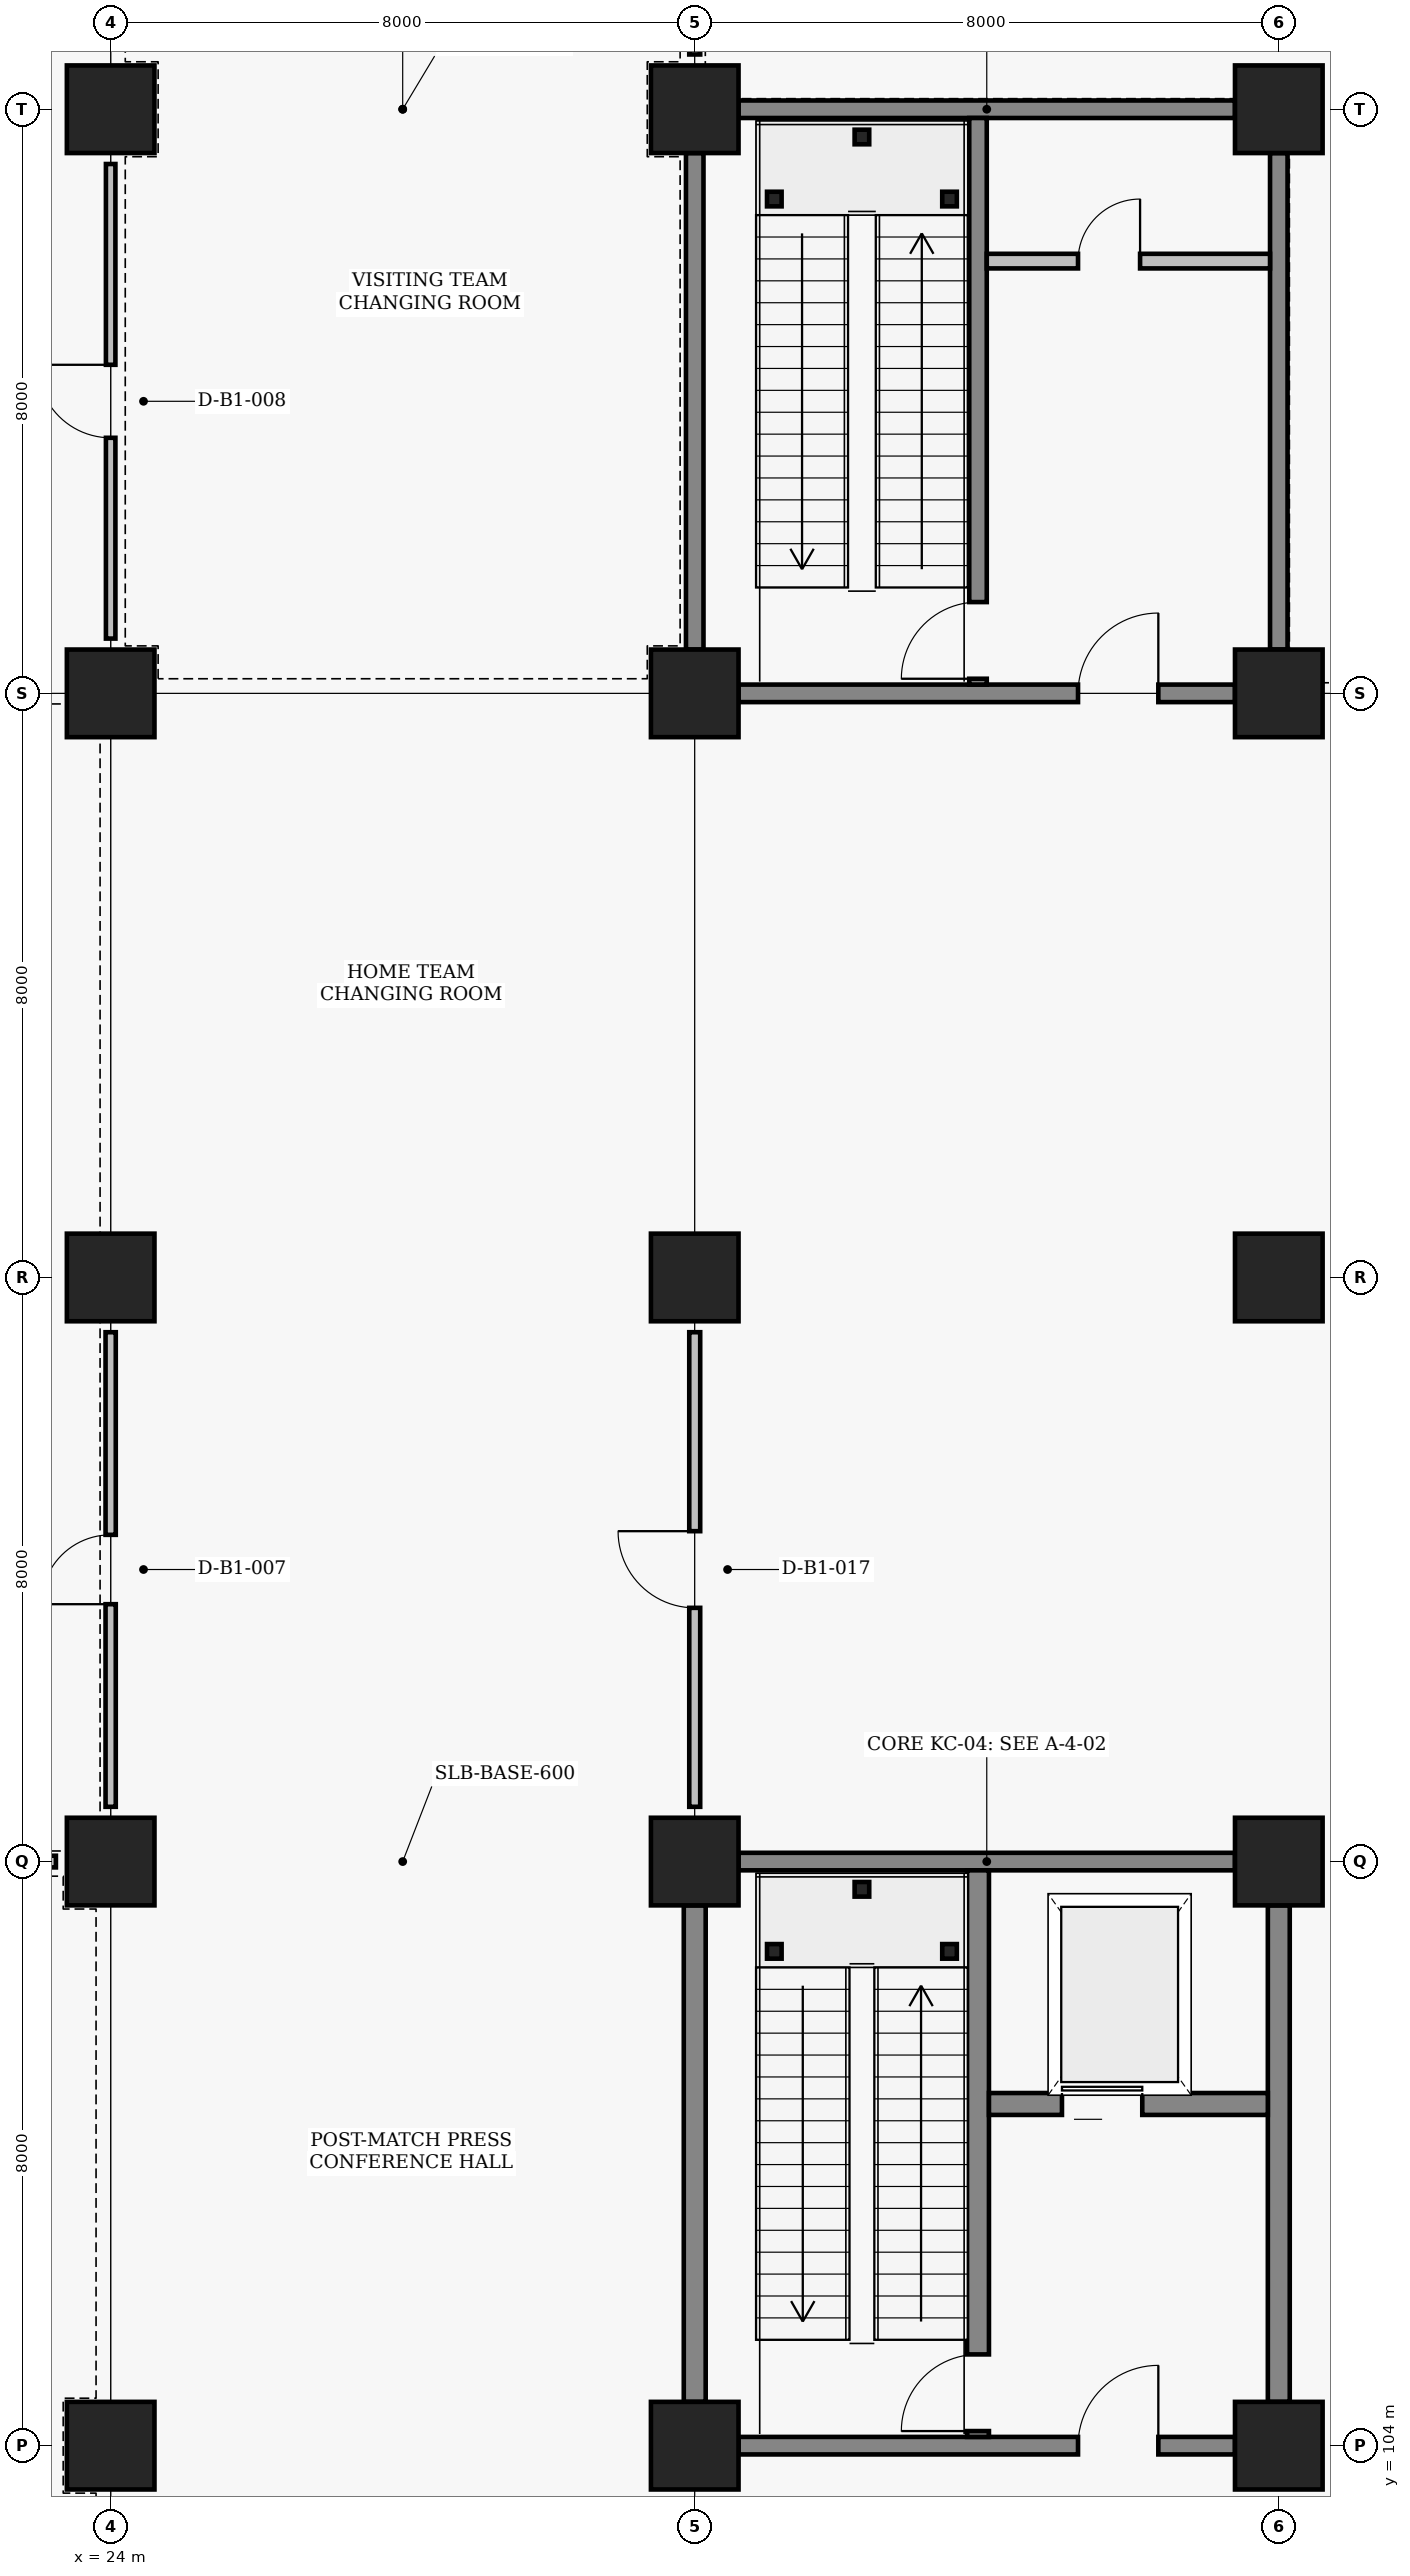
"""IFC4 building model, lengths in metres.
Left out: names, types, materials, properties, quantities, classifications, styles, units other than length and angle.
Written with IfcOpenShell. Run it as: python <this file> out.ifc"""

import sys

from ifc_helpers import new_model, si_unit, direction, frame, frame_2d, origin, origin_2d, place, context, subcontext, project, spatial, rectangle, hollow_rectangle, extrude, element, fill, save


model = new_model("IFC4")
c1 = context("Model", 3, precision=1e-05, world=origin(), true_north=direction((0.0, 1.0)))
c2 = subcontext(c1, "Body", "Model", "MODEL_VIEW")
j1 = project(units=[si_unit("LENGTHUNIT", "METRE"), si_unit("PLANEANGLEUNIT", "RADIAN")], contexts=[c1])
p1 = place(None, origin())
s1 = spatial("IfcSite", under=j1, at=p1, CompositionType="ELEMENT")
p2 = place(p1, origin())
s2 = spatial("IfcBuilding", under=s1, at=p2, CompositionType="ELEMENT")
p3 = place(p2, frame((0.0, 0.0, -5.4)))
s3 = spatial("IfcBuildingStorey", under=s2, at=p3, CompositionType="ELEMENT", Elevation=-5.4)
for number, where, z_axis, x_axis in (
    (1, (24.0, 104.0, 0.0), (0.0, 0.0, 1.0), (1.0, 0.0, 0.0)),
    (2, (24.0, 112.0, 0.0), (0.0, 0.0, 1.0), (1.0, 0.0, 0.0)),
    (3, (24.0, 120.0, 0.0), (0.0, 0.0, 1.0), (1.0, 0.0, 0.0)),
    (4, (24.0, 128.0, 0.0), (0.0, 0.0, 1.0), (1.0, 0.0, 0.0)),
    (5, (24.0, 136.0, 0.0), (0.0, 0.0, 1.0), (1.0, 0.0, 0.0)),
    (6, (32.0, 104.0, 0.0), (0.0, 0.0, 1.0), (1.0, 0.0, 0.0)),
    (7, (32.0, 112.0, 0.0), (0.0, 0.0, 1.0), (1.0, 0.0, 0.0)),
    (8, (32.0, 120.0, 0.0), (0.0, 0.0, 1.0), (1.0, 0.0, 0.0)),
    (9, (32.0, 128.0, 0.0), (0.0, 0.0, 1.0), (1.0, 0.0, 0.0)),
    (10, (32.0, 136.0, 0.0), (0.0, 0.0, 1.0), (1.0, 0.0, 0.0)),
    (11, (40.0, 104.0, 0.0), (0.0, 0.0, 1.0), (1.0, 0.0, 0.0)),
    (12, (40.0, 112.0, 0.0), (0.0, 0.0, 1.0), (1.0, 0.0, 0.0)),
    (13, (40.0, 120.0, 0.0), (0.0, 0.0, 1.0), (1.0, 0.0, 0.0)),
    (14, (40.0, 128.0, 0.0), (0.0, 0.0, 1.0), (1.0, 0.0, 0.0)),
    (15, (40.0, 136.0, 0.0), (0.0, 0.0, 1.0), (1.0, 0.0, 0.0)),
):
    element("IfcColumn", number, at=place(p3, frame(where, z_axis=z_axis, x_axis=x_axis)), inside=s3, PredefinedType="COLUMN", context=c2, shape_type="SweptSolid", body=[
        extrude(rectangle(XDim=1.2, YDim=1.2, at=origin_2d()), origin(), (0.0, 0.0, 1.0), 5.4),
    ])
p4 = place(p3, frame((32.6, 104.0, 0.0), z_axis=(0.0, 0.0, 1.0), x_axis=(1.0, 0.0, 0.0)))
e16 = element("IfcWall", 16, at=p4, inside=s3, PredefinedType="SHEAR", context=c2, shape_type="SweptSolid", body=[
    extrude(rectangle(XDim=6.8, YDim=0.24, at=frame_2d((3.4, 0.0))), origin(), (0.0, 0.0, 1.0), 4.59),
])
p5 = place(p4, frame((4.65, 0.0, 0.0)))
e17 = element("IfcOpeningElement", 17, at=p5, cuts=e16, PredefinedType="OPENING", context=c2, shape_type="SweptSolid", body=[
    extrude(rectangle(XDim=1.1, YDim=2.2, at=frame_2d((0.55, 1.1))), frame((0.0, 0.13, 0.0), z_axis=(0.0, -1.0, 0.0), x_axis=(1.0, 0.0, 0.0)), (0.0, 0.0, 1.0), 0.26),
])
p6 = place(p3, frame((32.6, 112.0, 0.0), z_axis=(0.0, 0.0, 1.0), x_axis=(1.0, 0.0, 0.0)))
e18 = element("IfcWall", 18, at=p6, inside=s3, PredefinedType="SHEAR", context=c2, shape_type="SweptSolid", body=[
    extrude(rectangle(XDim=6.8, YDim=0.24, at=frame_2d((3.4, 0.0))), origin(), (0.0, 0.0, 1.0), 4.59),
])
for number, where, z_axis, x_axis in (
    (19, (32.0, 104.6, 0.0), (0.0, 0.0, 1.0), (0.0, 1.0, 0.0)),
    (20, (40.0, 104.6, 0.0), (0.0, 0.0, 1.0), (0.0, 1.0, 0.0)),
):
    element("IfcWall", number, at=place(p3, frame(where, z_axis=z_axis, x_axis=x_axis)), inside=s3, PredefinedType="SHEAR", context=c2, shape_type="SweptSolid", body=[
        extrude(rectangle(XDim=6.8, YDim=0.3, at=frame_2d((3.4, 0.0))), origin(), (0.0, 0.0, 1.0), 4.39),
    ])
p7 = place(p3, frame((35.88, 104.12, 0.0), z_axis=(0.0, 0.0, 1.0), x_axis=(0.0, 1.0, 0.0)))
e21 = element("IfcWall", 21, at=p7, inside=s3, PredefinedType="SHEAR", context=c2, shape_type="SweptSolid", body=[
    extrude(rectangle(XDim=7.76, YDim=0.3, at=frame_2d((3.88, 0.0))), origin(), (0.0, 0.0, 1.0), 4.59),
])
p8 = place(p7, frame((0.08, 0.0, 0.0)))
e22 = element("IfcOpeningElement", 22, at=p8, cuts=e21, PredefinedType="OPENING", context=c2, shape_type="SweptSolid", body=[
    extrude(rectangle(XDim=1.05, YDim=2.15, at=frame_2d((0.525, 1.075))), frame((0.0, 0.16, 0.0), z_axis=(0.0, -1.0, 0.0), x_axis=(1.0, 0.0, 0.0)), (0.0, 0.0, 1.0), 0.32),
])
p9 = place(p3, frame((36.03, 108.68, 0.0), z_axis=(0.0, 0.0, 1.0), x_axis=(1.0, 0.0, 0.0)))
e23 = element("IfcWall", 23, at=p9, inside=s3, PredefinedType="SHEAR", context=c2, shape_type="SweptSolid", body=[
    extrude(rectangle(XDim=3.82, YDim=0.3, at=frame_2d((1.91, 0.0))), origin(), (0.0, 0.0, 1.0), 4.39),
])
p10 = place(p9, frame((1.0, 0.0, 0.0)))
e24 = element("IfcOpeningElement", 24, at=p10, cuts=e23, PredefinedType="OPENING", context=c2, shape_type="SweptSolid", body=[
    extrude(rectangle(XDim=1.1, YDim=2.15, at=frame_2d((0.55, 1.075))), frame((0.0, 0.16, 0.0), z_axis=(0.0, -1.0, 0.0), x_axis=(1.0, 0.0, 0.0)), (0.0, 0.0, 1.0), 0.32),
])
for number, where, z_axis, x_axis in (
    (25, (33.09, 110.77, 0.0), (0.0, 0.0, 1.0), (1.0, 0.0, 0.0)),
    (26, (35.49, 110.77, 0.0), (0.0, 0.0, 1.0), (1.0, 0.0, 0.0)),
    (27, (34.29, 111.62, 0.0), (0.0, 0.0, 1.0), (1.0, 0.0, 0.0)),
):
    element("IfcColumn", number, at=place(p3, frame(where, z_axis=z_axis, x_axis=x_axis)), inside=s3, PredefinedType="COLUMN", context=c2, shape_type="SweptSolid", body=[
        extrude(hollow_rectangle(XDim=0.2, YDim=0.2, WallThickness=0.009, at=origin_2d()), origin(), (0.0, 0.0, 1.0), 2.5),
    ])
p11 = place(p3, frame((32.6, 128.0, 0.0), z_axis=(0.0, 0.0, 1.0), x_axis=(1.0, 0.0, 0.0)))
e28 = element("IfcWall", 28, at=p11, inside=s3, PredefinedType="SHEAR", context=c2, shape_type="SweptSolid", body=[
    extrude(rectangle(XDim=6.8, YDim=0.24, at=frame_2d((3.4, 0.0))), origin(), (0.0, 0.0, 1.0), 3.69),
])
p12 = place(p11, frame((4.65, 0.0, 0.0)))
e29 = element("IfcOpeningElement", 29, at=p12, cuts=e28, PredefinedType="OPENING", context=c2, shape_type="SweptSolid", body=[
    extrude(rectangle(XDim=1.1, YDim=2.2, at=frame_2d((0.55, 1.1))), frame((0.0, 0.13, 0.0), z_axis=(0.0, -1.0, 0.0), x_axis=(1.0, 0.0, 0.0)), (0.0, 0.0, 1.0), 0.26),
])
p13 = place(p3, frame((32.6, 136.0, 0.0), z_axis=(0.0, 0.0, 1.0), x_axis=(1.0, 0.0, 0.0)))
e30 = element("IfcWall", 30, at=p13, inside=s3, PredefinedType="SHEAR", context=c2, shape_type="SweptSolid", body=[
    extrude(rectangle(XDim=6.8, YDim=0.24, at=frame_2d((3.4, 0.0))), origin(), (0.0, 0.0, 1.0), 4.59),
])
p14 = place(p3, frame((32.0, 128.6, 0.0), z_axis=(0.0, 0.0, 1.0), x_axis=(0.0, 1.0, 0.0)))
e31 = element("IfcWall", 31, at=p14, inside=s3, PredefinedType="SHEAR", context=c2, shape_type="SweptSolid", body=[
    extrude(rectangle(XDim=6.8, YDim=0.24, at=frame_2d((3.4, 0.0))), origin(), (0.0, 0.0, 1.0), 4.39),
])
p15 = place(p3, frame((40.0, 128.6, 0.0), z_axis=(0.0, 0.0, 1.0), x_axis=(0.0, 1.0, 0.0)))
e32 = element("IfcWall", 32, at=p15, inside=s3, PredefinedType="SHEAR", context=c2, shape_type="SweptSolid", body=[
    extrude(rectangle(XDim=6.8, YDim=0.24, at=frame_2d((3.4, 0.0))), origin(), (0.0, 0.0, 1.0), 3.69),
])
p16 = place(p3, frame((35.88, 128.12, 0.0), z_axis=(0.0, 0.0, 1.0), x_axis=(0.0, 1.0, 0.0)))
e33 = element("IfcWall", 33, at=p16, inside=s3, PredefinedType="SHEAR", context=c2, shape_type="SweptSolid", body=[
    extrude(rectangle(XDim=7.76, YDim=0.24, at=frame_2d((3.88, 0.0))), origin(), (0.0, 0.0, 1.0), 4.59),
])
p17 = place(p16, frame((0.08, 0.0, 0.0)))
e34 = element("IfcOpeningElement", 34, at=p17, cuts=e33, PredefinedType="OPENING", context=c2, shape_type="SweptSolid", body=[
    extrude(rectangle(XDim=1.05, YDim=2.15, at=frame_2d((0.525, 1.075))), frame((0.0, 0.13, 0.0), z_axis=(0.0, -1.0, 0.0), x_axis=(1.0, 0.0, 0.0)), (0.0, 0.0, 1.0), 0.26),
])
p18 = place(p3, frame((36.0, 133.92, 0.0), z_axis=(0.0, 0.0, 1.0), x_axis=(1.0, 0.0, 0.0)))
e35 = element("IfcWall", 35, at=p18, inside=s3, PredefinedType="PARTITIONING", context=c2, shape_type="SweptSolid", body=[
    extrude(rectangle(XDim=3.88, YDim=0.2, at=frame_2d((1.94, 0.0))), origin(), (0.0, 0.0, 1.0), 4.39),
])
p19 = place(p18, frame((1.25, 0.0, 0.0)))
e36 = element("IfcOpeningElement", 36, at=p19, cuts=e35, PredefinedType="OPENING", context=c2, shape_type="SweptSolid", body=[
    extrude(rectangle(XDim=0.85, YDim=2.05, at=frame_2d((0.425, 1.025))), frame((0.0, 0.11, 0.0), z_axis=(0.0, -1.0, 0.0), x_axis=(1.0, 0.0, 0.0)), (0.0, 0.0, 1.0), 0.22),
])
for number, where, z_axis, x_axis in (
    (37, (33.09, 134.77, 0.0), (0.0, 0.0, 1.0), (1.0, 0.0, 0.0)),
    (38, (35.49, 134.77, 0.0), (0.0, 0.0, 1.0), (1.0, 0.0, 0.0)),
    (39, (34.29, 135.62, 0.0), (0.0, 0.0, 1.0), (1.0, 0.0, 0.0)),
):
    element("IfcColumn", number, at=place(p3, frame(where, z_axis=z_axis, x_axis=x_axis)), inside=s3, PredefinedType="COLUMN", context=c2, shape_type="SweptSolid", body=[
        extrude(hollow_rectangle(XDim=0.2, YDim=0.2, WallThickness=0.009, at=origin_2d()), origin(), (0.0, 0.0, 1.0), 2.5),
    ])
p20 = place(p3, frame((24.0, 112.75, 0.0), z_axis=(0.0, 0.0, 1.0), x_axis=(0.0, 1.0, 0.0)))
e40 = element("IfcWall", 40, at=p20, inside=s3, PredefinedType="MOVABLE", context=c2, shape_type="SweptSolid", body=[
    extrude(rectangle(XDim=6.5, YDim=0.14, at=frame_2d((3.25, 0.0))), origin(), (0.0, 0.0, 1.0), 4.39),
])
p21 = place(p20, frame((2.775, 0.0, 0.0)))
e41 = element("IfcOpeningElement", 41, at=p21, cuts=e40, PredefinedType="OPENING", context=c2, shape_type="SweptSolid", body=[
    extrude(rectangle(XDim=0.95, YDim=2.1, at=frame_2d((0.475, 1.05))), frame((0.0, 0.08, 0.0), z_axis=(0.0, -1.0, 0.0), x_axis=(1.0, 0.0, 0.0)), (0.0, 0.0, 1.0), 0.16),
])
p22 = place(p3, frame((24.0, 128.75, 0.0), z_axis=(0.0, 0.0, 1.0), x_axis=(0.0, 1.0, 0.0)))
e42 = element("IfcWall", 42, at=p22, inside=s3, PredefinedType="PARTITIONING", context=c2, shape_type="SweptSolid", body=[
    extrude(rectangle(XDim=6.5, YDim=0.13, at=frame_2d((3.25, 0.0))), origin(), (0.0, 0.0, 1.0), 4.39),
])
p23 = place(p22, frame((2.75, 0.0, 0.0)))
e43 = element("IfcOpeningElement", 43, at=p23, cuts=e42, PredefinedType="OPENING", context=c2, shape_type="SweptSolid", body=[
    extrude(rectangle(XDim=1.0, YDim=2.1, at=frame_2d((0.5, 1.05))), frame((0.0, 0.075, 0.0), z_axis=(0.0, -1.0, 0.0), x_axis=(1.0, 0.0, 0.0)), (0.0, 0.0, 1.0), 0.15),
])
p24 = place(p3, frame((32.0, 112.75, 0.0), z_axis=(0.0, 0.0, 1.0), x_axis=(0.0, 1.0, 0.0)))
e44 = element("IfcWall", 44, at=p24, inside=s3, PredefinedType="PARTITIONING", context=c2, shape_type="SweptSolid", body=[
    extrude(rectangle(XDim=6.5, YDim=0.15, at=frame_2d((3.25, 0.0))), origin(), (0.0, 0.0, 1.0), 4.39),
])
p25 = place(p24, frame((2.725, 0.0, 0.0)))
e45 = element("IfcOpeningElement", 45, at=p25, cuts=e44, PredefinedType="OPENING", context=c2, shape_type="SweptSolid", body=[
    extrude(rectangle(XDim=1.05, YDim=2.15, at=frame_2d((0.525, 1.075))), frame((0.0, 0.085, 0.0), z_axis=(0.0, -1.0, 0.0), x_axis=(1.0, 0.0, 0.0)), (0.0, 0.0, 1.0), 0.17),
])
p26 = place(p3, frame((32.0, 136.75, 0.0), z_axis=(0.0, 0.0, 1.0), x_axis=(0.0, 1.0, 0.0)))
e46 = element("IfcWall", 46, at=p26, inside=s3, PredefinedType="PARTITIONING", context=c2, shape_type="SweptSolid", body=[
    extrude(rectangle(XDim=6.5, YDim=0.15, at=frame_2d((3.25, 0.0))), origin(), (0.0, 0.0, 1.0), 3.69),
])
p27 = place(p26, frame((2.35, 0.0, 0.0)))
e47 = element("IfcOpeningElement", 47, at=p27, cuts=e46, PredefinedType="OPENING", context=c2, shape_type="SweptSolid", body=[
    extrude(rectangle(XDim=1.8, YDim=2.3, at=frame_2d((0.9, 1.15))), frame((0.0, 0.085, 0.0), z_axis=(0.0, -1.0, 0.0), x_axis=(1.0, 0.0, 0.0)), (0.0, 0.0, 1.0), 0.17),
])
p28 = place(p3, frame((16.75, 112.0, 0.0), z_axis=(0.0, 0.0, 1.0), x_axis=(1.0, 0.0, 0.0)))
e48 = element("IfcWall", 48, at=p28, inside=s3, PredefinedType="PARTITIONING", context=c2, shape_type="SweptSolid", body=[
    extrude(rectangle(XDim=6.5, YDim=0.16, at=frame_2d((3.25, 0.0))), origin(), (0.0, 0.0, 1.0), 4.49),
])
p29 = place(p28, frame((2.75, 0.0, 0.0)))
e49 = element("IfcOpeningElement", 49, at=p29, cuts=e48, PredefinedType="OPENING", context=c2, shape_type="SweptSolid", body=[
    extrude(rectangle(XDim=1.0, YDim=2.1, at=frame_2d((0.5, 1.05))), frame((0.0, 0.09, 0.0), z_axis=(0.0, -1.0, 0.0), x_axis=(1.0, 0.0, 0.0)), (0.0, 0.0, 1.0), 0.18),
])
p30 = place(p5, origin())
e50 = element("IfcDoor", 50, at=p30, inside=s3, OperationType="SINGLE_SWING_RIGHT", PredefinedType="DOOR", context=c2, shape_type="SweptSolid", body=[
    extrude(rectangle(XDim=1.1, YDim=2.2, at=frame_2d((0.55, 1.1))), frame((0.0, 0.025, 0.0), z_axis=(0.0, -1.0, 0.0), x_axis=(1.0, 0.0, 0.0)), (0.0, 0.0, 1.0), 0.05),
])
fill(e17, e50)
p31 = place(p8, origin())
e51 = element("IfcDoor", 51, at=p31, inside=s3, OperationType="SINGLE_SWING_LEFT", PredefinedType="DOOR", context=c2, shape_type="SweptSolid", body=[
    extrude(rectangle(XDim=1.05, YDim=2.15, at=frame_2d((0.525, 1.075))), frame((0.0, 0.025, 0.0), z_axis=(0.0, -1.0, 0.0), x_axis=(1.0, 0.0, 0.0)), (0.0, 0.0, 1.0), 0.05),
])
fill(e22, e51)
p32 = place(p10, origin())
e52 = element("IfcDoor", 52, at=p32, inside=s3, OperationType="SLIDING_TO_LEFT", PredefinedType="DOOR", context=c2, shape_type="SweptSolid", body=[
    extrude(rectangle(XDim=1.1, YDim=2.15, at=frame_2d((0.55, 1.075))), frame((0.0, 0.025, 0.0), z_axis=(0.0, -1.0, 0.0), x_axis=(1.0, 0.0, 0.0)), (0.0, 0.0, 1.0), 0.05),
])
fill(e24, e52)
p33 = place(p12, origin())
e53 = element("IfcDoor", 53, at=p33, inside=s3, OperationType="SINGLE_SWING_RIGHT", PredefinedType="DOOR", context=c2, shape_type="SweptSolid", body=[
    extrude(rectangle(XDim=1.1, YDim=2.2, at=frame_2d((0.55, 1.1))), frame((0.0, 0.025, 0.0), z_axis=(0.0, -1.0, 0.0), x_axis=(1.0, 0.0, 0.0)), (0.0, 0.0, 1.0), 0.05),
])
fill(e29, e53)
p34 = place(p17, origin())
e54 = element("IfcDoor", 54, at=p34, inside=s3, OperationType="SINGLE_SWING_LEFT", PredefinedType="DOOR", context=c2, shape_type="SweptSolid", body=[
    extrude(rectangle(XDim=1.05, YDim=2.15, at=frame_2d((0.525, 1.075))), frame((0.0, 0.025, 0.0), z_axis=(0.0, -1.0, 0.0), x_axis=(1.0, 0.0, 0.0)), (0.0, 0.0, 1.0), 0.05),
])
fill(e34, e54)
p35 = place(p19, origin())
e55 = element("IfcDoor", 55, at=p35, inside=s3, OperationType="SINGLE_SWING_RIGHT", PredefinedType="TRAPDOOR", context=c2, shape_type="SweptSolid", body=[
    extrude(rectangle(XDim=0.85, YDim=2.05, at=frame_2d((0.425, 1.025))), frame((0.0, 0.025, 0.0), z_axis=(0.0, -1.0, 0.0), x_axis=(1.0, 0.0, 0.0)), (0.0, 0.0, 1.0), 0.05),
])
fill(e36, e55)
p36 = place(p21, origin())
e56 = element("IfcDoor", 56, at=p36, inside=s3, OperationType="SINGLE_SWING_LEFT", PredefinedType="DOOR", context=c2, shape_type="SweptSolid", body=[
    extrude(rectangle(XDim=0.95, YDim=2.1, at=frame_2d((0.475, 1.05))), frame((0.0, 0.025, 0.0), z_axis=(0.0, -1.0, 0.0), x_axis=(1.0, 0.0, 0.0)), (0.0, 0.0, 1.0), 0.05),
])
fill(e41, e56)
p37 = place(p23, origin())
e57 = element("IfcDoor", 57, at=p37, inside=s3, OperationType="SINGLE_SWING_RIGHT", PredefinedType="DOOR", context=c2, shape_type="SweptSolid", body=[
    extrude(rectangle(XDim=1.0, YDim=2.1, at=frame_2d((0.5, 1.05))), frame((0.0, 0.025, 0.0), z_axis=(0.0, -1.0, 0.0), x_axis=(1.0, 0.0, 0.0)), (0.0, 0.0, 1.0), 0.05),
])
fill(e43, e57)
p38 = place(p25, origin())
e58 = element("IfcDoor", 58, at=p38, inside=s3, OperationType="SINGLE_SWING_RIGHT", PredefinedType="DOOR", context=c2, shape_type="SweptSolid", body=[
    extrude(rectangle(XDim=1.05, YDim=2.15, at=frame_2d((0.525, 1.075))), frame((0.0, 0.025, 0.0), z_axis=(0.0, -1.0, 0.0), x_axis=(1.0, 0.0, 0.0)), (0.0, 0.0, 1.0), 0.05),
])
fill(e45, e58)
save(model, sys.argv[1])
